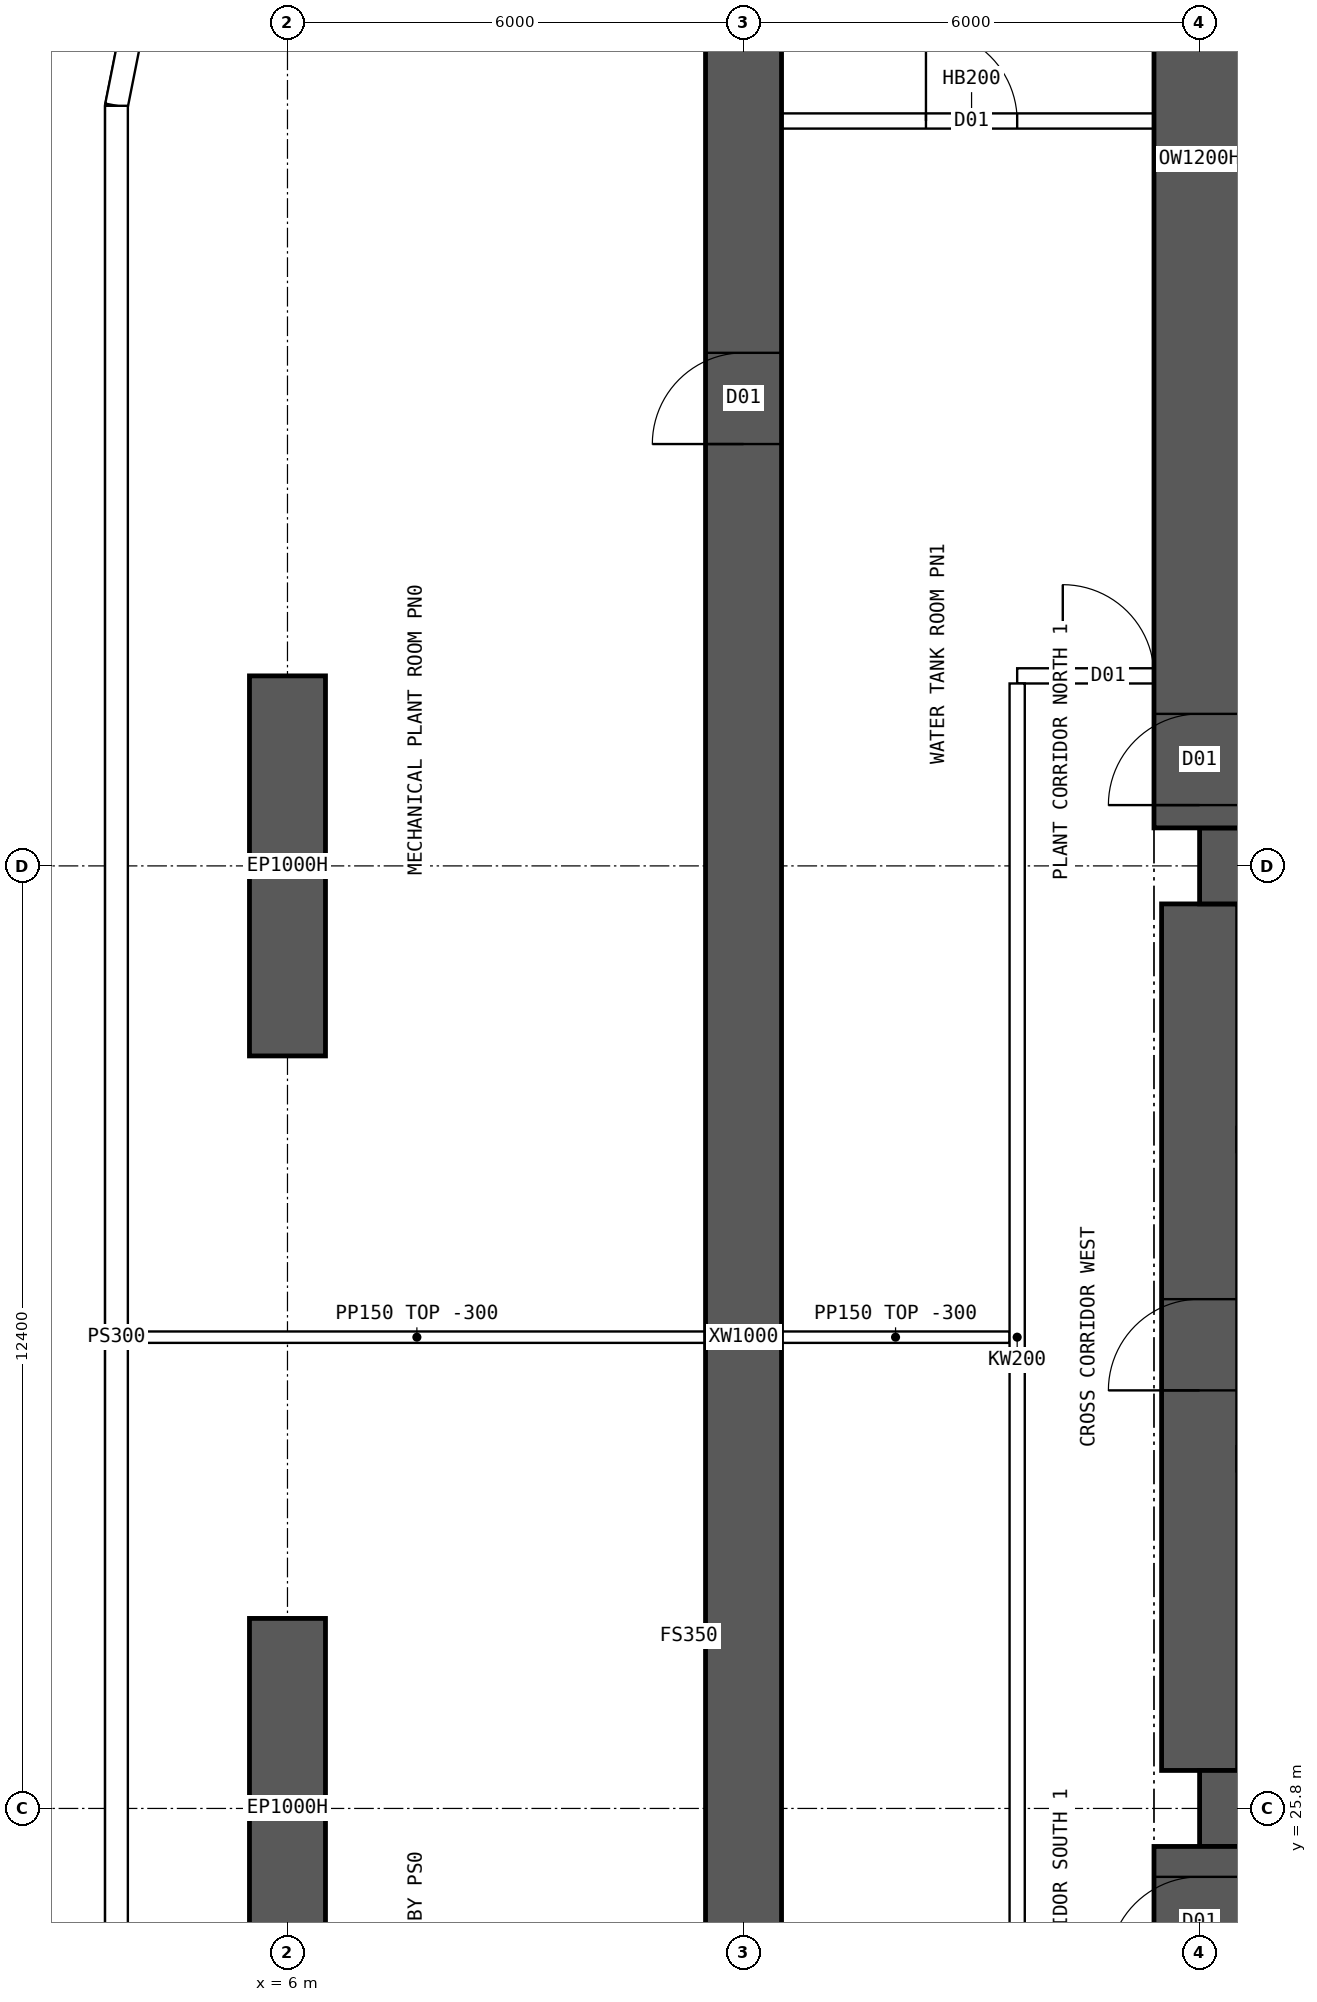
"""IFC4 building model, lengths in metres.
Left out: names, types, materials, properties, quantities, classifications, styles, units other than length and angle.
Written with IfcOpenShell. Run it as: python <this file> out.ifc"""

import sys

from ifc_helpers import new_model, si_unit, direction, frame, frame_2d, origin, place, context, subcontext, project, spatial, polyline, rectangle, outline, extrude, element, fill, save


model = new_model("IFC4")
c1 = context("Model", 3, precision=1e-05, world=origin(), true_north=direction((0.0, 1.0)))
c2 = subcontext(c1, "Body", "Model", "MODEL_VIEW")
j1 = project(units=[si_unit("LENGTHUNIT", "METRE"), si_unit("PLANEANGLEUNIT", "RADIAN")], contexts=[c1])
p1 = place(None, origin())
s1 = spatial("IfcSite", under=j1, at=p1, CompositionType="ELEMENT")
p2 = place(p1, origin())
s2 = spatial("IfcBuilding", under=s1, at=p2, CompositionType="ELEMENT")
p3 = place(p2, frame((0.0, 0.0, 68.95)))
s3 = spatial("IfcBuildingStorey", under=s2, at=p3, CompositionType="ELEMENT", Elevation=68.95)
for number, where, z_axis, x_axis in (
    (1, (6.0, 23.3, 0.0), (0.0, 0.0, 1.0), (0.0, 1.0, 0.0)),
    (2, (6.0, 35.7, 0.0), (0.0, 0.0, 1.0), (0.0, 1.0, 0.0)),
):
    element("IfcWall", number, at=place(p3, frame(where, z_axis=z_axis, x_axis=x_axis)), inside=s3, PredefinedType="SHEAR", context=c2, shape_type="SweptSolid", body=[
        extrude(rectangle(XDim=5.0, YDim=1.0, at=frame_2d((2.5, 0.0))), origin(), (0.0, 0.0, 1.0), 7.2),
    ])
for number, where, z_axis, x_axis in (
    (3, (18.0, 25.8, 0.0), (0.0, 0.0, 1.0), (1.0, 0.0, 0.0)),
    (4, (18.0, 38.2, 0.0), (0.0, 0.0, 1.0), (1.0, 0.0, 0.0)),
):
    element("IfcWall", number, at=place(p3, frame(where, z_axis=z_axis, x_axis=x_axis)), inside=s3, PredefinedType="SHEAR", context=c2, shape_type="SweptSolid", body=[
        extrude(rectangle(XDim=48.0, YDim=1.0, at=frame_2d((24.0, 0.0))), origin(), (0.0, 0.0, 1.0), 7.2),
    ])
p4 = place(p3, frame((18.0, 26.3, 0.0), z_axis=(0.0, 0.0, 1.0), x_axis=(0.0, 1.0, 0.0)))
e5 = element("IfcWall", 5, at=p4, inside=s3, PredefinedType="SHEAR", context=c2, shape_type="SweptSolid", body=[
    extrude(rectangle(XDim=11.4, YDim=1.0, at=frame_2d((5.7, 0.0))), origin(), (0.0, 0.0, 1.0), 7.2),
])
p5 = place(p4, frame((5.0, 0.0, 0.0)))
e6 = element("IfcOpeningElement", 6, at=p5, cuts=e5, PredefinedType="OPENING", context=c2, shape_type="SweptSolid", body=[
    extrude(rectangle(XDim=1.2, YDim=2.1, at=frame_2d((0.6, 1.05))), frame((0.0, 0.51, 0.0), z_axis=(0.0, -1.0, 0.0), x_axis=(1.0, 0.0, 0.0)), (0.0, 0.0, 1.0), 1.02),
])
p6 = place(p3, frame((12.0, 7.7, 0.0), z_axis=(0.0, 0.0, 1.0), x_axis=(0.0, 1.0, 0.0)))
e7 = element("IfcWall", 7, at=p6, inside=s3, PredefinedType="SHEAR", context=c2, shape_type="SweptSolid", body=[
    extrude(rectangle(XDim=48.6, YDim=1.0, at=frame_2d((24.3, 0.0))), origin(), (0.0, 0.0, 1.0), 7.2),
])
p7 = place(p6, frame((3.85, 0.0, 0.0)))
e8 = element("IfcOpeningElement", 8, at=p7, cuts=e7, PredefinedType="OPENING", context=c2, shape_type="SweptSolid", body=[
    extrude(rectangle(XDim=1.2, YDim=2.1, at=frame_2d((0.6, 1.05))), frame((0.0, 0.51, 0.0), z_axis=(0.0, -1.0, 0.0), x_axis=(1.0, 0.0, 0.0)), (0.0, 0.0, 1.0), 1.02),
])
p8 = place(p6, frame((11.35, 0.0, 0.0)))
e9 = element("IfcOpeningElement", 9, at=p8, cuts=e7, PredefinedType="OPENING", context=c2, shape_type="SweptSolid", body=[
    extrude(rectangle(XDim=1.2, YDim=2.1, at=frame_2d((0.6, 1.05))), frame((0.0, 0.51, 0.0), z_axis=(0.0, -1.0, 0.0), x_axis=(1.0, 0.0, 0.0)), (0.0, 0.0, 1.0), 1.02),
])
p9 = place(p6, frame((43.55, 0.0, 0.0)))
e10 = element("IfcOpeningElement", 10, at=p9, cuts=e7, PredefinedType="OPENING", context=c2, shape_type="SweptSolid", body=[
    extrude(rectangle(XDim=1.2, YDim=2.1, at=frame_2d((0.6, 1.05))), frame((0.0, 0.51, 0.0), z_axis=(0.0, -1.0, 0.0), x_axis=(1.0, 0.0, 0.0)), (0.0, 0.0, 1.0), 1.02),
])
p10 = place(p6, frame((36.05, 0.0, 0.0)))
e11 = element("IfcOpeningElement", 11, at=p10, cuts=e7, PredefinedType="OPENING", context=c2, shape_type="SweptSolid", body=[
    extrude(rectangle(XDim=1.2, YDim=2.1, at=frame_2d((0.6, 1.05))), frame((0.0, 0.51, 0.0), z_axis=(0.0, -1.0, 0.0), x_axis=(1.0, 0.0, 0.0)), (0.0, 0.0, 1.0), 1.02),
])
p11 = place(p3, frame((18.0, 7.7, 0.0), z_axis=(0.0, 0.0, 1.0), x_axis=(0.0, 1.0, 0.0)))
e12 = element("IfcWall", 12, at=p11, inside=s3, PredefinedType="SHEAR", context=c2, shape_type="SweptSolid", body=[
    extrude(rectangle(XDim=17.6, YDim=1.2, at=frame_2d((8.8, 0.0))), origin(), (0.0, 0.0, 1.0), 7.2),
])
p12 = place(p11, frame((16.0, 0.0, 0.0)))
e13 = element("IfcOpeningElement", 13, at=p12, cuts=e12, PredefinedType="OPENING", context=c2, shape_type="SweptSolid", body=[
    extrude(rectangle(XDim=1.2, YDim=2.1, at=frame_2d((0.6, 1.05))), frame((0.0, 0.61, 0.0), z_axis=(0.0, -1.0, 0.0), x_axis=(1.0, 0.0, 0.0)), (0.0, 0.0, 1.0), 1.22),
])
p13 = place(p3, frame((18.0, 38.7, 0.0), z_axis=(0.0, 0.0, 1.0), x_axis=(0.0, 1.0, 0.0)))
e14 = element("IfcWall", 14, at=p13, inside=s3, PredefinedType="SHEAR", context=c2, shape_type="SweptSolid", body=[
    extrude(rectangle(XDim=17.6, YDim=1.2, at=frame_2d((8.8, 0.0))), origin(), (0.0, 0.0, 1.0), 7.2),
])
p14 = place(p13, frame((0.3, 0.0, 0.0)))
e15 = element("IfcOpeningElement", 15, at=p14, cuts=e14, PredefinedType="OPENING", context=c2, shape_type="SweptSolid", body=[
    extrude(rectangle(XDim=1.2, YDim=2.1, at=frame_2d((0.6, 1.05))), frame((0.0, 0.61, 0.0), z_axis=(0.0, -1.0, 0.0), x_axis=(1.0, 0.0, 0.0)), (0.0, 0.0, 1.0), 1.22),
])
p15 = place(p3, frame((3.75, 48.2, 0.0), z_axis=(0.0, 0.0, 1.0), x_axis=(0.0, -1.0, 0.0)))
e16 = element("IfcWall", 16, at=p15, inside=s3, PredefinedType="SOLIDWALL", context=c2, shape_type="SweptSolid", body=[
    extrude(outline(polyline([(-0.015, -0.15), (32.415, -0.15), (32.385, 0.15), (0.015, 0.15), (-0.015, -0.15)])), origin(), (0.0, 0.0, 1.0), 6.9),
])
p16 = place(p3, frame((4.378, 51.357, 0.0), z_axis=(0.0, 0.0, 1.0), x_axis=(-0.195065901187, -0.980790137692, 0.0)))
e17 = element("IfcWall", 17, at=p16, inside=s3, PredefinedType="SOLIDWALL", context=c2, shape_type="SweptSolid", body=[
    extrude(outline(polyline([(-0.03, -0.15), (3.234, -0.15), (3.204, 0.15), (0.03, 0.15), (-0.03, -0.15)])), origin(), (0.0, 0.0, 1.0), 6.9),
])
p17 = place(p3, frame((15.6, 40.7, 0.0), z_axis=(0.0, 0.0, 1.0), x_axis=(1.0, 0.0, 0.0)))
e18 = element("IfcWall", 18, at=p17, inside=s3, PredefinedType="SOLIDWALL", context=c2, shape_type="SweptSolid", body=[
    extrude(rectangle(XDim=52.8, YDim=0.2, at=frame_2d((26.4, 0.0))), origin(), (0.0, 0.0, 1.0), 6.9),
])
p18 = place(p17, frame((0.6, 0.0, 0.0)))
e19 = element("IfcOpeningElement", 19, at=p18, cuts=e18, PredefinedType="OPENING", context=c2, shape_type="SweptSolid", body=[
    extrude(rectangle(XDim=1.2, YDim=2.1, at=frame_2d((0.6, 1.05))), frame((0.0, 0.11, 0.0), z_axis=(0.0, -1.0, 0.0), x_axis=(1.0, 0.0, 0.0)), (0.0, 0.0, 1.0), 0.22),
])
p19 = place(p17, frame((3.5, 0.0, 0.0)))
e20 = element("IfcOpeningElement", 20, at=p19, cuts=e18, PredefinedType="OPENING", context=c2, shape_type="SweptSolid", body=[
    extrude(rectangle(XDim=1.8, YDim=2.4, at=frame_2d((0.9, 1.2))), frame((0.0, 0.11, 0.0), z_axis=(0.0, -1.0, 0.0), x_axis=(1.0, 0.0, 0.0)), (0.0, 0.0, 1.0), 0.22),
])
p20 = place(p17, frame((9.5, 0.0, 0.0)))
e21 = element("IfcOpeningElement", 21, at=p20, cuts=e18, PredefinedType="OPENING", context=c2, shape_type="SweptSolid", body=[
    extrude(rectangle(XDim=1.8, YDim=2.4, at=frame_2d((0.9, 1.2))), frame((0.0, 0.11, 0.0), z_axis=(0.0, -1.0, 0.0), x_axis=(1.0, 0.0, 0.0)), (0.0, 0.0, 1.0), 0.22),
])
p21 = place(p17, frame((15.5, 0.0, 0.0)))
e22 = element("IfcOpeningElement", 22, at=p21, cuts=e18, PredefinedType="OPENING", context=c2, shape_type="SweptSolid", body=[
    extrude(rectangle(XDim=1.8, YDim=2.4, at=frame_2d((0.9, 1.2))), frame((0.0, 0.11, 0.0), z_axis=(0.0, -1.0, 0.0), x_axis=(1.0, 0.0, 0.0)), (0.0, 0.0, 1.0), 0.22),
])
p22 = place(p17, frame((21.5, 0.0, 0.0)))
e23 = element("IfcOpeningElement", 23, at=p22, cuts=e18, PredefinedType="OPENING", context=c2, shape_type="SweptSolid", body=[
    extrude(rectangle(XDim=1.8, YDim=2.4, at=frame_2d((0.9, 1.2))), frame((0.0, 0.11, 0.0), z_axis=(0.0, -1.0, 0.0), x_axis=(1.0, 0.0, 0.0)), (0.0, 0.0, 1.0), 0.22),
])
p23 = place(p17, frame((27.5, 0.0, 0.0)))
e24 = element("IfcOpeningElement", 24, at=p23, cuts=e18, PredefinedType="OPENING", context=c2, shape_type="SweptSolid", body=[
    extrude(rectangle(XDim=1.8, YDim=2.4, at=frame_2d((0.9, 1.2))), frame((0.0, 0.11, 0.0), z_axis=(0.0, -1.0, 0.0), x_axis=(1.0, 0.0, 0.0)), (0.0, 0.0, 1.0), 0.22),
])
p24 = place(p17, frame((33.5, 0.0, 0.0)))
e25 = element("IfcOpeningElement", 25, at=p24, cuts=e18, PredefinedType="OPENING", context=c2, shape_type="SweptSolid", body=[
    extrude(rectangle(XDim=1.8, YDim=2.4, at=frame_2d((0.9, 1.2))), frame((0.0, 0.11, 0.0), z_axis=(0.0, -1.0, 0.0), x_axis=(1.0, 0.0, 0.0)), (0.0, 0.0, 1.0), 0.22),
])
p25 = place(p17, frame((39.5, 0.0, 0.0)))
e26 = element("IfcOpeningElement", 26, at=p25, cuts=e18, PredefinedType="OPENING", context=c2, shape_type="SweptSolid", body=[
    extrude(rectangle(XDim=1.8, YDim=2.4, at=frame_2d((0.9, 1.2))), frame((0.0, 0.11, 0.0), z_axis=(0.0, -1.0, 0.0), x_axis=(1.0, 0.0, 0.0)), (0.0, 0.0, 1.0), 0.22),
])
p26 = place(p17, frame((45.5, 0.0, 0.0)))
e27 = element("IfcOpeningElement", 27, at=p26, cuts=e18, PredefinedType="OPENING", context=c2, shape_type="SweptSolid", body=[
    extrude(rectangle(XDim=1.8, YDim=2.4, at=frame_2d((0.9, 1.2))), frame((0.0, 0.11, 0.0), z_axis=(0.0, -1.0, 0.0), x_axis=(1.0, 0.0, 0.0)), (0.0, 0.0, 1.0), 0.22),
])
p27 = place(p17, frame((51.5, 0.0, 0.0)))
e28 = element("IfcOpeningElement", 28, at=p27, cuts=e18, PredefinedType="OPENING", context=c2, shape_type="SweptSolid", body=[
    extrude(rectangle(XDim=1.2, YDim=2.1, at=frame_2d((0.6, 1.05))), frame((0.0, 0.11, 0.0), z_axis=(0.0, -1.0, 0.0), x_axis=(1.0, 0.0, 0.0)), (0.0, 0.0, 1.0), 0.22),
])
p28 = place(p3, frame((15.6, 23.4, 0.0), z_axis=(0.0, 0.0, 1.0), x_axis=(0.0, 1.0, 0.0)))
e29 = element("IfcWall", 29, at=p28, inside=s3, PredefinedType="SOLIDWALL", context=c2, shape_type="SweptSolid", body=[
    extrude(rectangle(XDim=17.2, YDim=0.2, at=frame_2d((8.6, 0.0))), origin(), (0.0, 0.0, 1.0), 6.9),
])
p29 = place(p3, frame((12.5, 48.0, 0.0), z_axis=(0.0, 0.0, 1.0), x_axis=(1.0, 0.0, 0.0)))
e30 = element("IfcWall", 30, at=p29, inside=s3, PredefinedType="SOLIDWALL", context=c2, shape_type="SweptSolid", body=[
    extrude(rectangle(XDim=5.0, YDim=0.2, at=frame_2d((2.5, 0.0))), origin(), (0.0, 0.0, 1.0), 6.9),
])
p30 = place(p29, frame((1.9, 0.0, 0.0)))
e31 = element("IfcOpeningElement", 31, at=p30, cuts=e30, PredefinedType="OPENING", context=c2, shape_type="SweptSolid", body=[
    extrude(rectangle(XDim=1.2, YDim=2.1, at=frame_2d((0.6, 1.05))), frame((0.0, 0.11, 0.0), z_axis=(0.0, -1.0, 0.0), x_axis=(1.0, 0.0, 0.0)), (0.0, 0.0, 1.0), 0.22),
])
p31 = place(p3, frame((3.905, 32.0, 0.0), z_axis=(0.0, 0.0, 1.0), x_axis=(1.0, 0.0, 0.0)))
e32 = element("IfcWall", 32, at=p31, inside=s3, PredefinedType="PARTITIONING", context=c2, shape_type="SweptSolid", body=[
    extrude(outline(polyline([(0.0, 0.0), (7.595, 0.0), (7.595, 6.9), (2.397, 6.9), (2.395, 6.45), (1.797, 6.45), (1.795, 6.9), (0.0, 6.9), (0.0, 0.0)])), frame((0.0, 0.075, 0.0), z_axis=(0.0, -1.0, 0.0), x_axis=(1.0, 0.0, 0.0)), (0.0, 0.0, 1.0), 0.15),
])
p32 = place(p3, frame((12.5, 32.0, 0.0), z_axis=(0.0, 0.0, 1.0), x_axis=(1.0, 0.0, 0.0)))
e33 = element("IfcWall", 33, at=p32, inside=s3, PredefinedType="PARTITIONING", context=c2, shape_type="SweptSolid", body=[
    extrude(rectangle(XDim=3.0, YDim=0.15, at=frame_2d((1.5, 0.0))), origin(), (0.0, 0.0, 1.0), 6.9),
])
p33 = place(p5, origin())
e34 = element("IfcDoor", 34, at=p33, inside=s3, OperationType="SINGLE_SWING_LEFT", PredefinedType="DOOR", context=c2, shape_type="SweptSolid", body=[
    extrude(rectangle(XDim=1.2, YDim=2.1, at=frame_2d((0.6, 1.05))), frame((0.0, 0.025, 0.0), z_axis=(0.0, -1.0, 0.0), x_axis=(1.0, 0.0, 0.0)), (0.0, 0.0, 1.0), 0.05),
])
fill(e6, e34)
p34 = place(p30, origin())
e35 = element("IfcDoor", 35, at=p34, inside=s3, OperationType="SINGLE_SWING_LEFT", PredefinedType="DOOR", context=c2, shape_type="SweptSolid", body=[
    extrude(rectangle(XDim=1.2, YDim=2.1, at=frame_2d((0.6, 1.05))), frame((0.0, 0.025, 0.0), z_axis=(0.0, -1.0, 0.0), x_axis=(1.0, 0.0, 0.0)), (0.0, 0.0, 1.0), 0.05),
])
fill(e31, e35)
p35 = place(p18, origin())
e36 = element("IfcDoor", 36, at=p35, inside=s3, OperationType="SINGLE_SWING_LEFT", PredefinedType="DOOR", context=c2, shape_type="SweptSolid", body=[
    extrude(rectangle(XDim=1.2, YDim=2.1, at=frame_2d((0.6, 1.05))), frame((0.0, 0.025, 0.0), z_axis=(0.0, -1.0, 0.0), x_axis=(1.0, 0.0, 0.0)), (0.0, 0.0, 1.0), 0.05),
])
fill(e19, e36)
p36 = place(p12, origin())
e37 = element("IfcDoor", 37, at=p36, inside=s3, OperationType="SINGLE_SWING_LEFT", PredefinedType="DOOR", context=c2, shape_type="SweptSolid", body=[
    extrude(rectangle(XDim=1.2, YDim=2.1, at=frame_2d((0.6, 1.05))), frame((0.0, 0.025, 0.0), z_axis=(0.0, -1.0, 0.0), x_axis=(1.0, 0.0, 0.0)), (0.0, 0.0, 1.0), 0.05),
])
fill(e13, e37)
p37 = place(p14, origin())
e38 = element("IfcDoor", 38, at=p37, inside=s3, OperationType="SINGLE_SWING_LEFT", PredefinedType="DOOR", context=c2, shape_type="SweptSolid", body=[
    extrude(rectangle(XDim=1.2, YDim=2.1, at=frame_2d((0.6, 1.05))), frame((0.0, 0.025, 0.0), z_axis=(0.0, -1.0, 0.0), x_axis=(1.0, 0.0, 0.0)), (0.0, 0.0, 1.0), 0.05),
])
fill(e15, e38)
p38 = place(p10, origin())
e39 = element("IfcDoor", 39, at=p38, inside=s3, OperationType="SINGLE_SWING_LEFT", PredefinedType="DOOR", context=c2, shape_type="SweptSolid", body=[
    extrude(rectangle(XDim=1.2, YDim=2.1, at=frame_2d((0.6, 1.05))), frame((0.0, 0.485, 0.0), z_axis=(0.0, -1.0, 0.0), x_axis=(1.0, 0.0, 0.0)), (0.0, 0.0, 1.0), 0.05),
])
fill(e11, e39)
save(model, sys.argv[1])
